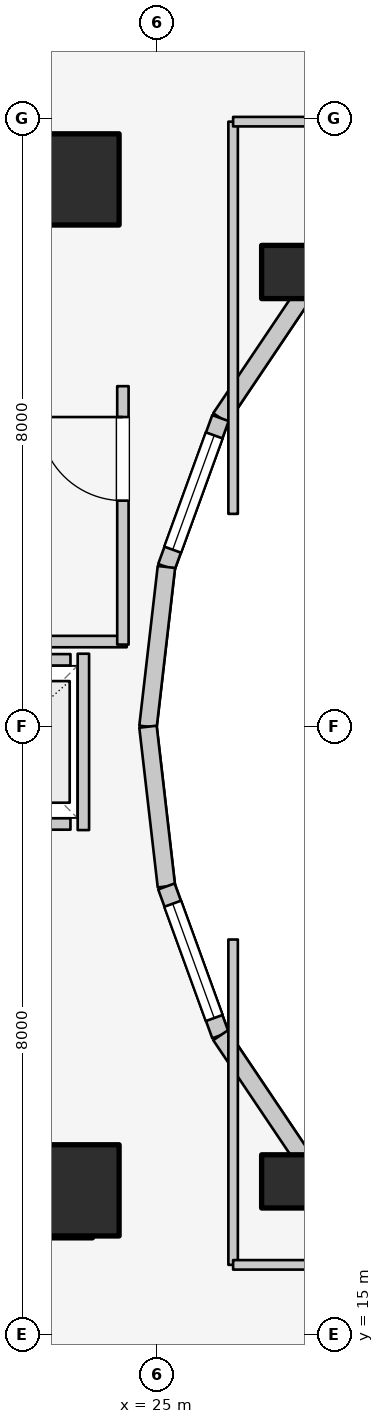
"""IFC4 building model, lengths in metres.
Left out: names, types, materials, properties, quantities, classifications, styles, units other than length and angle.
Written with IfcOpenShell. Run it as: python <this file> out.ifc"""

import sys

from ifc_helpers import new_model, si_unit, direction, frame, frame_2d, origin, origin_2d, place, context, subcontext, project, spatial, rectangle, extrude, element, fill, save


model = new_model("IFC4")
c1 = context("Model", 3, precision=1e-05, world=origin(), true_north=direction((0.0, 1.0)))
c2 = subcontext(c1, "Body", "Model", "MODEL_VIEW")
j1 = project(units=[si_unit("LENGTHUNIT", "METRE"), si_unit("PLANEANGLEUNIT", "RADIAN")], contexts=[c1])
p1 = place(None, origin())
s1 = spatial("IfcSite", under=j1, at=p1, CompositionType="ELEMENT")
p2 = place(p1, origin())
s2 = spatial("IfcBuilding", under=s1, at=p2, CompositionType="ELEMENT")
p3 = place(p2, frame((0.0, 0.0, 232.6)))
s3 = spatial("IfcBuildingStorey", under=s2, at=p3, CompositionType="ELEMENT", Elevation=232.6)
for number, where, z_axis, x_axis in (
    (1, (19.65, 16.55, 0.0), (0.0, 0.0, 1.0), (1.0, 0.0, 0.0)),
    (2, (19.65, 30.35, 0.0), (0.0, 0.0, 1.0), (1.0, 0.0, 0.0)),
):
    element("IfcWall", number, at=place(p3, frame(where, z_axis=z_axis, x_axis=x_axis)), inside=s3, PredefinedType="SHEAR", context=c2, shape_type="SweptSolid", body=[
        extrude(rectangle(XDim=4.5, YDim=0.55, at=frame_2d((2.25, 0.0))), origin(), (0.0, 0.0, 1.0), 3.1),
    ])
for number, where, z_axis, x_axis in (
    (3, (23.9, 16.9, 0.0), (0.0, 0.0, 1.0), (1.0, 0.0, 0.0)),
    (4, (23.9, 30.2, 0.0), (0.0, 0.0, 1.0), (1.0, 0.0, 0.0)),
):
    element("IfcColumn", number, at=place(p3, frame(where, z_axis=z_axis, x_axis=x_axis)), inside=s3, PredefinedType="COLUMN", context=c2, shape_type="SweptSolid", body=[
        extrude(rectangle(XDim=1.2, YDim=1.2, at=origin_2d()), origin(), (0.0, 0.0, 1.0), 3.1),
    ])
for number, where, z_axis, x_axis in (
    (5, (26.725, 28.982, 0.0), (0.0, 0.0, 1.0), (1.0, 0.0, 0.0)),
    (6, (26.725, 17.018, 0.0), (0.0, 0.0, 1.0), (1.0, 0.0, 0.0)),
):
    element("IfcColumn", number, at=place(p3, frame(where, z_axis=z_axis, x_axis=x_axis)), inside=s3, PredefinedType="COLUMN", context=c2, shape_type="SweptSolid", body=[
        extrude(rectangle(XDim=0.7, YDim=0.7, at=origin_2d()), origin(), (0.0, 0.0, 1.0), 3.1),
    ])
p4 = place(p3, frame((28.44, 30.032, 0.0), z_axis=(0.0, 0.0, 1.0), x_axis=(-0.752576694707, -0.658504607869, 0.0)))
e7 = element("IfcWall", 7, at=p4, inside=s3, PredefinedType="STANDARD", context=c2, shape_type="SweptSolid", body=[
    extrude(rectangle(XDim=1.959, YDim=0.23, at=frame_2d((0.98, 0.0))), origin(), (0.0, 0.0, 1.0), 2.16),
])
p5 = place(p3, frame((26.965, 28.742, 0.0), z_axis=(0.0, 0.0, 1.0), x_axis=(-0.558197800898, -0.829707909492, 0.0)))
e8 = element("IfcWall", 8, at=p5, inside=s3, PredefinedType="STANDARD", context=c2, shape_type="SweptSolid", body=[
    extrude(rectangle(XDim=2.027, YDim=0.23, at=frame_2d((1.013, 0.0))), origin(), (0.0, 0.0, 1.0), 2.16),
])
p6 = place(p3, frame((25.834, 27.06, 0.0), z_axis=(0.0, 0.0, 1.0), x_axis=(-0.341423187295, -0.93990968033, 0.0)))
e9 = element("IfcWall", 9, at=p6, inside=s3, PredefinedType="STANDARD", context=c2, shape_type="SweptSolid", body=[
    extrude(rectangle(XDim=2.084, YDim=0.23, at=frame_2d((1.042, 0.0))), origin(), (0.0, 0.0, 1.0), 2.84),
])
p7 = place(p6, frame((0.242, 0.0, 0.85)))
e10 = element("IfcOpeningElement", 10, at=p7, cuts=e9, PredefinedType="OPENING", context=c2, shape_type="SweptSolid", body=[
    extrude(rectangle(XDim=1.6, YDim=1.65, at=frame_2d((0.8, 0.825))), frame((0.0, 0.125, 0.0), z_axis=(0.0, -1.0, 0.0), x_axis=(1.0, 0.0, 0.0)), (0.0, 0.0, 1.0), 0.25),
])
for number, where, z_axis, x_axis in (
    (11, (25.123, 25.102, 0.0), (0.0, 0.0, 1.0), (-0.115, -0.993, 0.0)),
    (12, (24.88, 23.0, 0.0), (0.0, 0.0, 1.0), (0.115, -0.993, 0.0)),
):
    element("IfcWall", number, at=place(p3, frame(where, z_axis=z_axis, x_axis=x_axis)), inside=s3, PredefinedType="STANDARD", context=c2, shape_type="SweptSolid", body=[
        extrude(rectangle(XDim=2.115, YDim=0.23, at=frame_2d((1.058, 0.0))), origin(), (0.0, 0.0, 1.0), 2.84),
    ])
p8 = place(p3, frame((25.123, 20.898, 0.0), z_axis=(0.0, 0.0, 1.0), x_axis=(0.341423187295, -0.93990968033, 0.0)))
e13 = element("IfcWall", 13, at=p8, inside=s3, PredefinedType="STANDARD", context=c2, shape_type="SweptSolid", body=[
    extrude(rectangle(XDim=2.084, YDim=0.23, at=frame_2d((1.042, 0.0))), origin(), (0.0, 0.0, 1.0), 2.84),
])
p9 = place(p8, frame((0.242, 0.0, 0.85)))
e14 = element("IfcOpeningElement", 14, at=p9, cuts=e13, PredefinedType="OPENING", context=c2, shape_type="SweptSolid", body=[
    extrude(rectangle(XDim=1.6, YDim=1.65, at=frame_2d((0.8, 0.825))), frame((0.0, 0.125, 0.0), z_axis=(0.0, -1.0, 0.0), x_axis=(1.0, 0.0, 0.0)), (0.0, 0.0, 1.0), 0.25),
])
p10 = place(p3, frame((25.834, 18.94, 0.0), z_axis=(0.0, 0.0, 1.0), x_axis=(0.558197800898, -0.829707909492, 0.0)))
e15 = element("IfcWall", 15, at=p10, inside=s3, PredefinedType="STANDARD", context=c2, shape_type="SweptSolid", body=[
    extrude(rectangle(XDim=2.027, YDim=0.23, at=frame_2d((1.013, 0.0))), origin(), (0.0, 0.0, 1.0), 2.16),
])
p11 = place(p3, frame((26.965, 17.258, 0.0), z_axis=(0.0, 0.0, 1.0), x_axis=(0.752576694707, -0.658504607869, 0.0)))
e16 = element("IfcWall", 16, at=p11, inside=s3, PredefinedType="STANDARD", context=c2, shape_type="SweptSolid", body=[
    extrude(rectangle(XDim=1.959, YDim=0.23, at=frame_2d((0.98, 0.0))), origin(), (0.0, 0.0, 1.0), 2.16),
])
p12 = place(p3, frame((22.04, 21.72, 0.0), z_axis=(0.0, 0.0, 1.0), x_axis=(1.0, 0.0, 0.0)))
e17 = element("IfcWall", 17, at=p12, inside=s3, PredefinedType="SOLIDWALL", context=c2, shape_type="SweptSolid", body=[
    extrude(rectangle(XDim=1.82, YDim=0.15, at=frame_2d((0.91, 0.0))), origin(), (0.0, 0.0, 1.0), 2.12),
])
p13 = place(p12, frame((0.36, 0.0, 0.0)))
e18 = element("IfcOpeningElement", 18, at=p13, cuts=e17, PredefinedType="OPENING", context=c2, shape_type="SweptSolid", body=[
    extrude(rectangle(XDim=1.1, YDim=2.1, at=frame_2d((0.55, 1.05))), frame((0.0, 0.085, 0.0), z_axis=(0.0, -1.0, 0.0), x_axis=(1.0, 0.0, 0.0)), (0.0, 0.0, 1.0), 0.17),
])
p14 = place(p3, frame((22.04, 23.88, 0.0), z_axis=(0.0, 0.0, 1.0), x_axis=(1.0, 0.0, 0.0)))
e19 = element("IfcWall", 19, at=p14, inside=s3, PredefinedType="SOLIDWALL", context=c2, shape_type="SweptSolid", body=[
    extrude(rectangle(XDim=1.82, YDim=0.15, at=frame_2d((0.91, 0.0))), origin(), (0.0, 0.0, 1.0), 2.12),
])
p15 = place(p3, frame((24.03, 21.64, 0.0), z_axis=(0.0, 0.0, 1.0), x_axis=(0.0, 1.0, 0.0)))
e20 = element("IfcWall", 20, at=p15, inside=s3, PredefinedType="SOLIDWALL", context=c2, shape_type="SweptSolid", body=[
    extrude(rectangle(XDim=2.32, YDim=0.15, at=frame_2d((1.16, 0.0))), origin(), (0.0, 0.0, 1.0), 2.12),
])
p16 = place(p3, frame((19.52, 24.12, 0.0), z_axis=(0.0, 0.0, 1.0), x_axis=(1.0, 0.0, 0.0)))
e21 = element("IfcWall", 21, at=p16, inside=s3, PredefinedType="PARTITIONING", context=c2, shape_type="SweptSolid", body=[
    extrude(rectangle(XDim=5.08, YDim=0.15, at=frame_2d((2.54, 0.0))), origin(), (0.0, 0.0, 1.0), 2.12),
])
p17 = place(p3, frame((24.55, 24.08, 0.0), z_axis=(0.0, 0.0, 1.0), x_axis=(0.0, 1.0, 0.0)))
e22 = element("IfcWall", 22, at=p17, inside=s3, PredefinedType="PARTITIONING", context=c2, shape_type="SweptSolid", body=[
    extrude(rectangle(XDim=3.4, YDim=0.15, at=frame_2d((1.7, 0.0))), origin(), (0.0, 0.0, 1.0), 2.855),
])
p18 = place(p17, frame((1.894, 0.0, 0.0)))
e23 = element("IfcOpeningElement", 23, at=p18, cuts=e22, PredefinedType="OPENING", context=c2, shape_type="SweptSolid", body=[
    extrude(rectangle(XDim=1.1, YDim=2.1, at=frame_2d((0.55, 1.05))), frame((0.0, 0.085, 0.0), z_axis=(0.0, -1.0, 0.0), x_axis=(1.0, 0.0, 0.0)), (0.0, 0.0, 1.0), 0.17),
])
p19 = place(p3, frame((28.45, 30.015, 0.0), z_axis=(0.0, 0.0, 1.0), x_axis=(-0.522763432117, 0.852477796802, 0.0)))
e24 = element("IfcWall", 24, at=p19, inside=s3, PredefinedType="PARTITIONING", context=c2, shape_type="SweptSolid", body=[
    extrude(rectangle(XDim=3.269, YDim=0.125, at=frame_2d((1.635, 0.0))), origin(), (0.0, 0.0, 1.0), 2.376),
])
p20 = place(p3, frame((28.45, 15.985, 0.0), z_axis=(0.0, 0.0, 1.0), x_axis=(-0.52592395012, -0.850531597702, 0.0)))
e25 = element("IfcWall", 25, at=p20, inside=s3, PredefinedType="PARTITIONING", context=c2, shape_type="SweptSolid", body=[
    extrude(rectangle(XDim=2.869, YDim=0.125, at=frame_2d((1.435, 0.0))), origin(), (0.0, 0.0, 1.0), 2.376),
])
p21 = place(p3, frame((26.0, 25.8, 0.0), z_axis=(0.0, 0.0, 1.0), x_axis=(0.0, 1.0, 0.0)))
e26 = element("IfcWall", 26, at=p21, inside=s3, PredefinedType="PARTITIONING", context=c2, shape_type="SweptSolid", body=[
    extrude(rectangle(XDim=5.16, YDim=0.125, at=frame_2d((2.58, 0.0))), origin(), (0.0, 0.0, 1.0), 2.232),
])
p22 = place(p3, frame((26.0, 30.96, 0.0), z_axis=(0.0, 0.0, 1.0), x_axis=(1.0, 0.0, 0.0)))
e27 = element("IfcWall", 27, at=p22, inside=s3, PredefinedType="PARTITIONING", context=c2, shape_type="SweptSolid", body=[
    extrude(rectangle(XDim=2.6, YDim=0.125, at=frame_2d((1.3, 0.0))), origin(), (0.0, 0.0, 1.0), 2.376),
])
p23 = place(p3, frame((26.0, 15.92, 0.0), z_axis=(0.0, 0.0, 1.0), x_axis=(0.0, 1.0, 0.0)))
e28 = element("IfcWall", 28, at=p23, inside=s3, PredefinedType="PARTITIONING", context=c2, shape_type="SweptSolid", body=[
    extrude(rectangle(XDim=4.28, YDim=0.125, at=frame_2d((2.14, 0.0))), origin(), (0.0, 0.0, 1.0), 2.232),
])
p24 = place(p3, frame((26.0, 15.92, 0.0), z_axis=(0.0, 0.0, 1.0), x_axis=(1.0, 0.0, 0.0)))
e29 = element("IfcWall", 29, at=p24, inside=s3, PredefinedType="PARTITIONING", context=c2, shape_type="SweptSolid", body=[
    extrude(rectangle(XDim=2.6, YDim=0.125, at=frame_2d((1.3, 0.0))), origin(), (0.0, 0.0, 1.0), 2.232),
])
p25 = place(p7, origin())
e30 = element("IfcWindow", 30, at=p25, inside=s3, PartitioningType="SINGLE_PANEL", PredefinedType="WINDOW", context=c2, shape_type="SweptSolid", body=[
    extrude(rectangle(XDim=1.6, YDim=1.65, at=frame_2d((0.8, 0.825))), frame((0.0, 0.03, 0.0), z_axis=(0.0, -1.0, 0.0), x_axis=(1.0, 0.0, 0.0)), (0.0, 0.0, 1.0), 0.06),
])
fill(e10, e30)
p26 = place(p9, origin())
e31 = element("IfcWindow", 31, at=p26, inside=s3, PartitioningType="SINGLE_PANEL", PredefinedType="WINDOW", context=c2, shape_type="SweptSolid", body=[
    extrude(rectangle(XDim=1.6, YDim=1.65, at=frame_2d((0.8, 0.825))), frame((0.0, 0.03, 0.0), z_axis=(0.0, -1.0, 0.0), x_axis=(1.0, 0.0, 0.0)), (0.0, 0.0, 1.0), 0.06),
])
fill(e14, e31)
p27 = place(p18, origin())
e32 = element("IfcDoor", 32, at=p27, inside=s3, OperationType="SINGLE_SWING_RIGHT", PredefinedType="DOOR", context=c2, shape_type="SweptSolid", body=[
    extrude(rectangle(XDim=1.1, YDim=2.1, at=frame_2d((0.55, 1.05))), frame((0.0, 0.025, 0.0), z_axis=(0.0, -1.0, 0.0), x_axis=(1.0, 0.0, 0.0)), (0.0, 0.0, 1.0), 0.05),
])
fill(e23, e32)
save(model, sys.argv[1])
